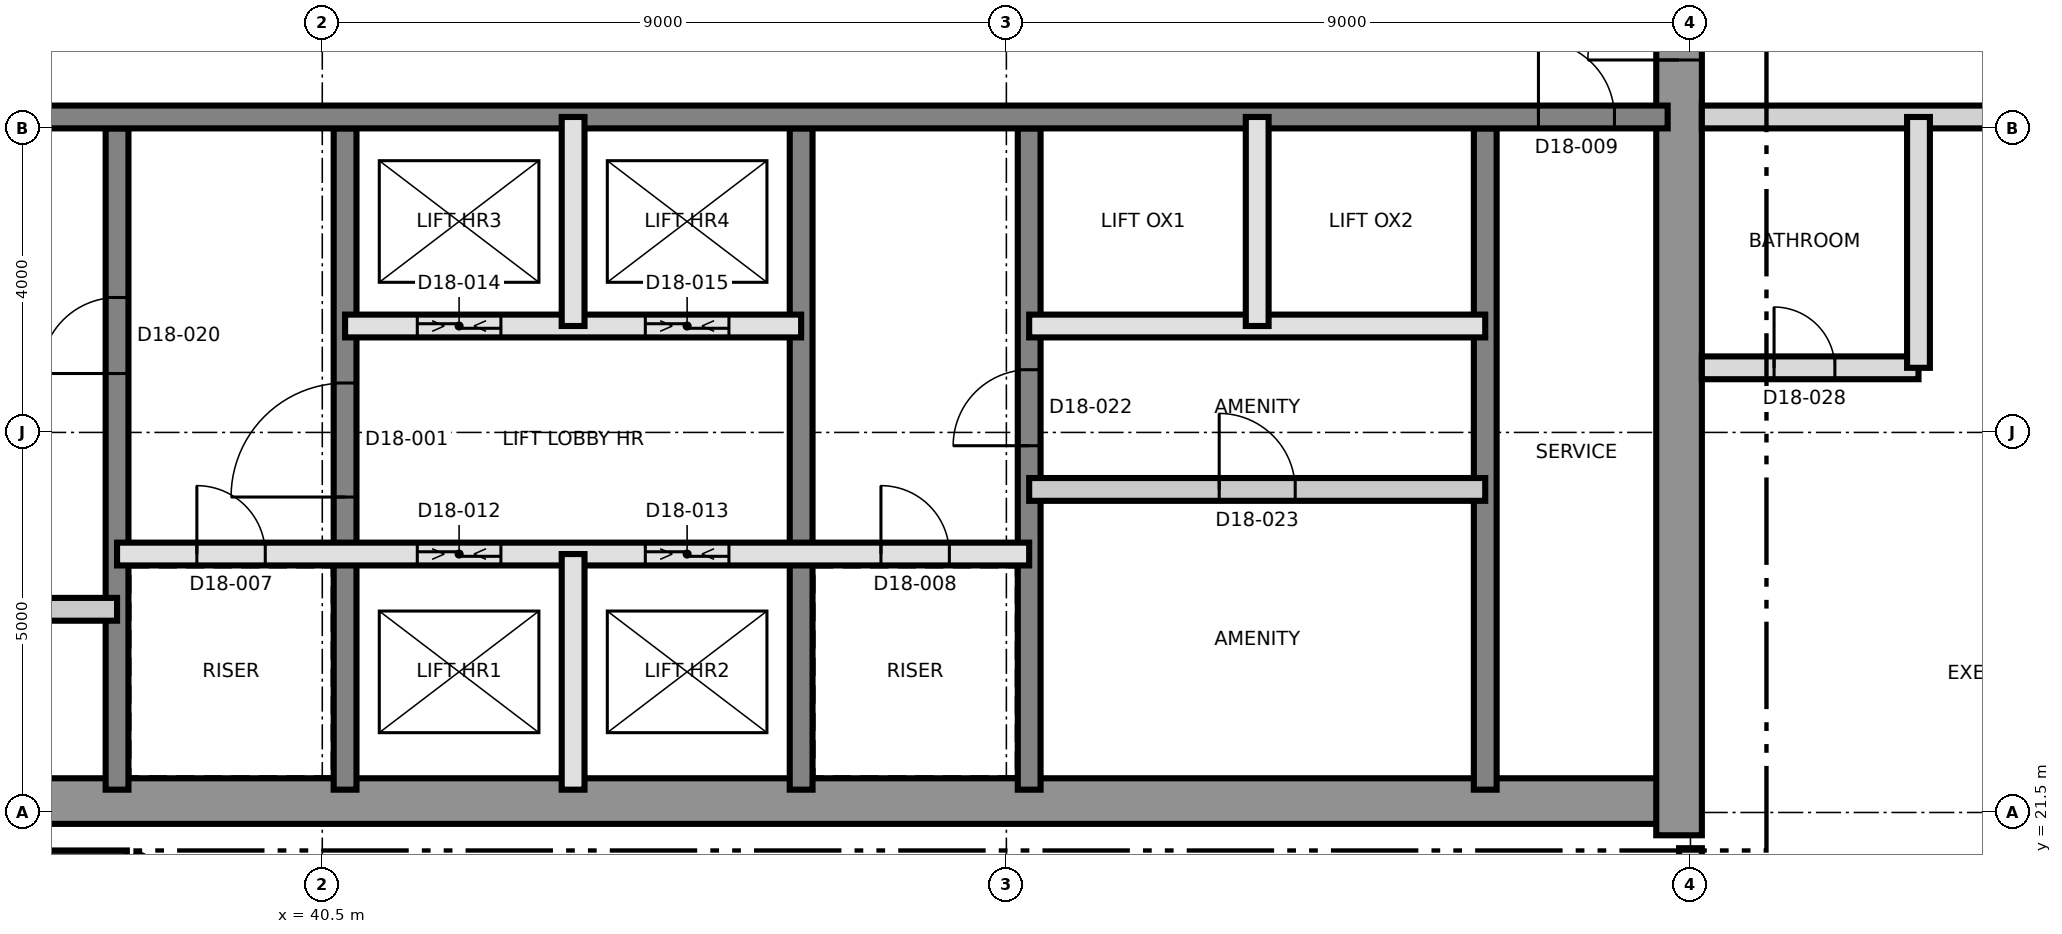
"""IFC4 building model, lengths in metres.
Left out: names, types, materials, properties, quantities, classifications, styles, units other than length and angle.
Written with IfcOpenShell. Run it as: python <this file> out.ifc"""

import sys

from ifc_helpers import new_model, si_unit, direction, frame, frame_2d, origin, place, context, subcontext, project, spatial, rectangle, extrude, element, fill, save


model = new_model("IFC4")
c1 = context("Model", 3, precision=1e-05, world=origin(), true_north=direction((0.0, 1.0)))
c2 = subcontext(c1, "Body", "Model", "MODEL_VIEW")
j1 = project(units=[si_unit("LENGTHUNIT", "METRE"), si_unit("PLANEANGLEUNIT", "RADIAN")], contexts=[c1])
p1 = place(None, origin())
s1 = spatial("IfcSite", under=j1, at=p1, CompositionType="ELEMENT")
p2 = place(p1, origin())
s2 = spatial("IfcBuilding", under=s1, at=p2, CompositionType="ELEMENT")
p3 = place(p2, frame((0.0, 0.0, 175.5)))
s3 = spatial("IfcBuildingStorey", under=s2, at=p3, CompositionType="ELEMENT", Elevation=175.5)
p4 = place(p3, frame((31.2, 21.65, 0.0), z_axis=(0.0, 0.0, 1.0), x_axis=(1.0, 0.0, 0.0)))
e1 = element("IfcWall", 1, at=p4, inside=s3, PredefinedType="SHEAR", context=c2, shape_type="SweptSolid", body=[
    extrude(rectangle(XDim=27.0, YDim=0.6, at=frame_2d((13.5, 0.0))), origin(), (0.0, 0.0, 1.0), 3.7),
])
p5 = place(p3, frame((58.35, 21.2, 0.0), z_axis=(0.0, 0.0, 1.0), x_axis=(0.0, 1.0, 0.0)))
e2 = element("IfcWall", 2, at=p5, inside=s3, PredefinedType="SHEAR", context=c2, shape_type="SweptSolid", body=[
    extrude(rectangle(XDim=18.6, YDim=0.6, at=frame_2d((9.3, 0.0))), origin(), (0.0, 0.0, 1.0), 3.7),
])
p6 = place(p5, frame((10.2, 0.0, 0.0)))
e3 = element("IfcOpeningElement", 3, at=p6, cuts=e2, PredefinedType="OPENING", context=c2, shape_type="SweptSolid", body=[
    extrude(rectangle(XDim=1.2, YDim=2.1, at=frame_2d((0.6, 1.05))), frame((0.0, 0.31, 0.0), z_axis=(0.0, -1.0, 0.0), x_axis=(1.0, 0.0, 0.0)), (0.0, 0.0, 1.0), 0.62),
])
p7 = place(p3, frame((37.8, 21.8, 0.0), z_axis=(0.0, 0.0, 1.0), x_axis=(0.0, 1.0, 0.0)))
e4 = element("IfcWall", 4, at=p7, inside=s3, PredefinedType="SHEAR", context=c2, shape_type="SweptSolid", body=[
    extrude(rectangle(XDim=8.7, YDim=0.3, at=frame_2d((4.35, 0.0))), origin(), (0.0, 0.0, 1.0), 3.7),
])
p8 = place(p7, frame((5.475, 0.0, 0.0)))
e5 = element("IfcOpeningElement", 5, at=p8, cuts=e4, PredefinedType="OPENING", context=c2, shape_type="SweptSolid", body=[
    extrude(rectangle(XDim=1.0, YDim=2.1, at=frame_2d((0.5, 1.05))), frame((0.0, 0.16, 0.0), z_axis=(0.0, -1.0, 0.0), x_axis=(1.0, 0.0, 0.0)), (0.0, 0.0, 1.0), 0.32),
])
p9 = place(p3, frame((40.8, 21.8, 0.0), z_axis=(0.0, 0.0, 1.0), x_axis=(0.0, 1.0, 0.0)))
e6 = element("IfcWall", 6, at=p9, inside=s3, PredefinedType="SHEAR", context=c2, shape_type="SweptSolid", body=[
    extrude(rectangle(XDim=8.7, YDim=0.3, at=frame_2d((4.35, 0.0))), origin(), (0.0, 0.0, 1.0), 3.7),
])
p10 = place(p9, frame((3.85, 0.0, 0.0)))
e7 = element("IfcOpeningElement", 7, at=p10, cuts=e6, PredefinedType="OPENING", context=c2, shape_type="SweptSolid", body=[
    extrude(rectangle(XDim=1.5, YDim=2.1, at=frame_2d((0.75, 1.05))), frame((0.0, 0.16, 0.0), z_axis=(0.0, -1.0, 0.0), x_axis=(1.0, 0.0, 0.0)), (0.0, 0.0, 1.0), 0.32),
])
p11 = place(p3, frame((46.8, 21.8, 0.0), z_axis=(0.0, 0.0, 1.0), x_axis=(0.0, 1.0, 0.0)))
e8 = element("IfcWall", 8, at=p11, inside=s3, PredefinedType="SHEAR", context=c2, shape_type="SweptSolid", body=[
    extrude(rectangle(XDim=8.7, YDim=0.3, at=frame_2d((4.35, 0.0))), origin(), (0.0, 0.0, 1.0), 3.7),
])
p12 = place(p3, frame((49.8, 21.8, 0.0), z_axis=(0.0, 0.0, 1.0), x_axis=(0.0, 1.0, 0.0)))
e9 = element("IfcWall", 9, at=p12, inside=s3, PredefinedType="SHEAR", context=c2, shape_type="SweptSolid", body=[
    extrude(rectangle(XDim=8.7, YDim=0.3, at=frame_2d((4.35, 0.0))), origin(), (0.0, 0.0, 1.0), 3.7),
])
p13 = place(p12, frame((4.525, 0.0, 0.0)))
e10 = element("IfcOpeningElement", 10, at=p13, cuts=e9, PredefinedType="OPENING", context=c2, shape_type="SweptSolid", body=[
    extrude(rectangle(XDim=1.0, YDim=2.1, at=frame_2d((0.5, 1.05))), frame((0.0, 0.16, 0.0), z_axis=(0.0, -1.0, 0.0), x_axis=(1.0, 0.0, 0.0)), (0.0, 0.0, 1.0), 0.32),
])
p14 = place(p3, frame((55.8, 21.8, 0.0), z_axis=(0.0, 0.0, 1.0), x_axis=(0.0, 1.0, 0.0)))
e11 = element("IfcWall", 11, at=p14, inside=s3, PredefinedType="SHEAR", context=c2, shape_type="SweptSolid", body=[
    extrude(rectangle(XDim=8.7, YDim=0.3, at=frame_2d((4.35, 0.0))), origin(), (0.0, 0.0, 1.0), 3.7),
])
p15 = place(p3, frame((31.8, 30.65, 0.0), z_axis=(0.0, 0.0, 1.0), x_axis=(1.0, 0.0, 0.0)))
e12 = element("IfcWall", 12, at=p15, inside=s3, PredefinedType="SHEAR", context=c2, shape_type="SweptSolid", body=[
    extrude(rectangle(XDim=26.4, YDim=0.3, at=frame_2d((13.2, 0.0))), origin(), (0.0, 0.0, 1.0), 3.7),
])
p16 = place(p15, frame((24.7, 0.0, 0.0)))
e13 = element("IfcOpeningElement", 13, at=p16, cuts=e12, PredefinedType="OPENING", context=c2, shape_type="SweptSolid", body=[
    extrude(rectangle(XDim=1.0, YDim=2.1, at=frame_2d((0.5, 1.05))), frame((0.0, 0.16, 0.0), z_axis=(0.0, -1.0, 0.0), x_axis=(1.0, 0.0, 0.0)), (0.0, 0.0, 1.0), 0.32),
])
p17 = place(p3, frame((31.36, 20.85, 0.0), z_axis=(0.0, 0.0, 1.0), x_axis=(1.0, 0.0, 0.0)))
e14 = element("IfcWall", 14, at=p17, inside=s3, PredefinedType="SOLIDWALL", context=c2, shape_type="SweptSolid", body=[
    extrude(rectangle(XDim=6.569, YDim=0.3, at=frame_2d((3.285, 0.0))), origin(), (0.0, 0.0, 1.0), 3.4),
])
p18 = place(p3, frame((37.995, 20.834, 0.0), z_axis=(0.0, 0.0, 1.0), x_axis=(0.896947675211, -0.442136707291, 0.0)))
e15 = element("IfcWall", 15, at=p18, inside=s3, PredefinedType="SOLIDWALL", context=c2, shape_type="SweptSolid", body=[
    extrude(rectangle(XDim=0.501, YDim=0.3, at=frame_2d((0.25, 0.0))), origin(), (0.0, 0.0, 1.0), 3.4),
])
p19 = place(p3, frame((31.8, 24.173, 0.0), z_axis=(0.0, 0.0, 1.0), x_axis=(1.0, 0.0, 0.0)))
e16 = element("IfcWall", 16, at=p19, inside=s3, PredefinedType="PARTITIONING", context=c2, shape_type="SweptSolid", body=[
    extrude(rectangle(XDim=6.0, YDim=0.3, at=frame_2d((3.0, 0.0))), origin(), (0.0, 0.0, 1.0), 3.4),
])
p20 = place(p19, frame((2.5, 0.0, 0.0)))
e17 = element("IfcOpeningElement", 17, at=p20, cuts=e16, PredefinedType="OPENING", context=c2, shape_type="SweptSolid", body=[
    extrude(rectangle(XDim=1.0, YDim=2.1, at=frame_2d((0.5, 1.05))), frame((0.0, 0.16, 0.0), z_axis=(0.0, -1.0, 0.0), x_axis=(1.0, 0.0, 0.0)), (0.0, 0.0, 1.0), 0.32),
])
p21 = place(p3, frame((37.8, 24.9, 0.0), z_axis=(0.0, 0.0, 1.0), x_axis=(1.0, 0.0, 0.0)))
e18 = element("IfcWall", 18, at=p21, inside=s3, PredefinedType="SOLIDWALL", context=c2, shape_type="SweptSolid", body=[
    extrude(rectangle(XDim=12.0, YDim=0.3, at=frame_2d((6.0, 0.0))), origin(), (0.0, 0.0, 1.0), 3.4),
])
p22 = place(p21, frame((1.05, 0.0, 0.0)))
e19 = element("IfcOpeningElement", 19, at=p22, cuts=e18, PredefinedType="OPENING", context=c2, shape_type="SweptSolid", body=[
    extrude(rectangle(XDim=0.9, YDim=2.1, at=frame_2d((0.45, 1.05))), frame((0.0, 0.16, 0.0), z_axis=(0.0, -1.0, 0.0), x_axis=(1.0, 0.0, 0.0)), (0.0, 0.0, 1.0), 0.32),
])
p23 = place(p21, frame((10.05, 0.0, 0.0)))
e20 = element("IfcOpeningElement", 20, at=p23, cuts=e18, PredefinedType="OPENING", context=c2, shape_type="SweptSolid", body=[
    extrude(rectangle(XDim=0.9, YDim=2.1, at=frame_2d((0.45, 1.05))), frame((0.0, 0.16, 0.0), z_axis=(0.0, -1.0, 0.0), x_axis=(1.0, 0.0, 0.0)), (0.0, 0.0, 1.0), 0.32),
])
p24 = place(p21, frame((3.95, 0.0, 0.0)))
e21 = element("IfcOpeningElement", 21, at=p24, cuts=e18, PredefinedType="OPENING", context=c2, shape_type="SweptSolid", body=[
    extrude(rectangle(XDim=1.1, YDim=2.4, at=frame_2d((0.55, 1.2))), frame((0.0, 0.16, 0.0), z_axis=(0.0, -1.0, 0.0), x_axis=(1.0, 0.0, 0.0)), (0.0, 0.0, 1.0), 0.32),
])
p25 = place(p21, frame((6.95, 0.0, 0.0)))
e22 = element("IfcOpeningElement", 22, at=p25, cuts=e18, PredefinedType="OPENING", context=c2, shape_type="SweptSolid", body=[
    extrude(rectangle(XDim=1.1, YDim=2.4, at=frame_2d((0.55, 1.2))), frame((0.0, 0.16, 0.0), z_axis=(0.0, -1.0, 0.0), x_axis=(1.0, 0.0, 0.0)), (0.0, 0.0, 1.0), 0.32),
])
p26 = place(p3, frame((49.8, 25.75, 0.0), z_axis=(0.0, 0.0, 1.0), x_axis=(1.0, 0.0, 0.0)))
e23 = element("IfcWall", 23, at=p26, inside=s3, PredefinedType="PARTITIONING", context=c2, shape_type="SweptSolid", body=[
    extrude(rectangle(XDim=6.0, YDim=0.3, at=frame_2d((3.0, 0.0))), origin(), (0.0, 0.0, 1.0), 3.4),
])
p27 = place(p26, frame((2.5, 0.0, 0.0)))
e24 = element("IfcOpeningElement", 24, at=p27, cuts=e23, PredefinedType="OPENING", context=c2, shape_type="SweptSolid", body=[
    extrude(rectangle(XDim=1.0, YDim=2.1, at=frame_2d((0.5, 1.05))), frame((0.0, 0.16, 0.0), z_axis=(0.0, -1.0, 0.0), x_axis=(1.0, 0.0, 0.0)), (0.0, 0.0, 1.0), 0.32),
])
p28 = place(p3, frame((40.8, 27.9, 0.0), z_axis=(0.0, 0.0, 1.0), x_axis=(1.0, 0.0, 0.0)))
e25 = element("IfcWall", 25, at=p28, inside=s3, PredefinedType="SOLIDWALL", context=c2, shape_type="SweptSolid", body=[
    extrude(rectangle(XDim=6.0, YDim=0.3, at=frame_2d((3.0, 0.0))), origin(), (0.0, 0.0, 1.0), 3.4),
])
p29 = place(p28, frame((0.95, 0.0, 0.0)))
e26 = element("IfcOpeningElement", 26, at=p29, cuts=e25, PredefinedType="OPENING", context=c2, shape_type="SweptSolid", body=[
    extrude(rectangle(XDim=1.1, YDim=2.4, at=frame_2d((0.55, 1.2))), frame((0.0, 0.16, 0.0), z_axis=(0.0, -1.0, 0.0), x_axis=(1.0, 0.0, 0.0)), (0.0, 0.0, 1.0), 0.32),
])
p30 = place(p28, frame((3.95, 0.0, 0.0)))
e27 = element("IfcOpeningElement", 27, at=p30, cuts=e25, PredefinedType="OPENING", context=c2, shape_type="SweptSolid", body=[
    extrude(rectangle(XDim=1.1, YDim=2.4, at=frame_2d((0.55, 1.2))), frame((0.0, 0.16, 0.0), z_axis=(0.0, -1.0, 0.0), x_axis=(1.0, 0.0, 0.0)), (0.0, 0.0, 1.0), 0.32),
])
p31 = place(p3, frame((49.8, 27.9, 0.0), z_axis=(0.0, 0.0, 1.0), x_axis=(1.0, 0.0, 0.0)))
e28 = element("IfcWall", 28, at=p31, inside=s3, PredefinedType="SOLIDWALL", context=c2, shape_type="SweptSolid", body=[
    extrude(rectangle(XDim=6.0, YDim=0.3, at=frame_2d((3.0, 0.0))), origin(), (0.0, 0.0, 1.0), 3.4),
])
p32 = place(p3, frame((43.8, 21.8, 0.0), z_axis=(0.0, 0.0, 1.0), x_axis=(0.0, 1.0, 0.0)))
e29 = element("IfcWall", 29, at=p32, inside=s3, PredefinedType="SOLIDWALL", context=c2, shape_type="SweptSolid", body=[
    extrude(rectangle(XDim=3.1, YDim=0.3, at=frame_2d((1.55, 0.0))), origin(), (0.0, 0.0, 1.0), 3.4),
])
for number, where, z_axis, x_axis in (
    (30, (43.8, 27.9, 0.0), (0.0, 0.0, 1.0), (0.0, 1.0, 0.0)),
    (31, (52.8, 27.9, 0.0), (0.0, 0.0, 1.0), (0.0, 1.0, 0.0)),
):
    element("IfcWall", number, at=place(p3, frame(where, z_axis=z_axis, x_axis=x_axis)), inside=s3, PredefinedType="SOLIDWALL", context=c2, shape_type="SweptSolid", body=[
        extrude(rectangle(XDim=2.75, YDim=0.3, at=frame_2d((1.375, 0.0))), origin(), (0.0, 0.0, 1.0), 3.4),
    ])
p33 = place(p3, frame((58.65, 27.35, 0.0), z_axis=(0.0, 0.0, 1.0), x_axis=(1.0, 0.0, 0.0)))
e32 = element("IfcWall", 32, at=p33, inside=s3, PredefinedType="PARTITIONING", context=c2, shape_type="SweptSolid", body=[
    extrude(rectangle(XDim=2.85, YDim=0.3, at=frame_2d((1.425, 0.0))), origin(), (0.0, 0.0, 1.0), 3.4),
])
p34 = place(p33, frame((0.95, 0.0, 0.0)))
e33 = element("IfcOpeningElement", 33, at=p34, cuts=e32, PredefinedType="OPENING", context=c2, shape_type="SweptSolid", body=[
    extrude(rectangle(XDim=0.8, YDim=2.1, at=frame_2d((0.4, 1.05))), frame((0.0, 0.16, 0.0), z_axis=(0.0, -1.0, 0.0), x_axis=(1.0, 0.0, 0.0)), (0.0, 0.0, 1.0), 0.32),
])
p35 = place(p3, frame((58.65, 30.65, 0.0), z_axis=(0.0, 0.0, 1.0), x_axis=(1.0, 0.0, 0.0)))
e34 = element("IfcWall", 34, at=p35, inside=s3, PredefinedType="PARTITIONING", context=c2, shape_type="SweptSolid", body=[
    extrude(rectangle(XDim=10.28, YDim=0.3, at=frame_2d((5.14, 0.0))), origin(), (0.0, 0.0, 1.0), 2.8),
])
p36 = place(p35, frame((3.85, 0.0, 0.0)))
e35 = element("IfcOpeningElement", 35, at=p36, cuts=e34, PredefinedType="OPENING", context=c2, shape_type="SweptSolid", body=[
    extrude(rectangle(XDim=1.0, YDim=2.4, at=frame_2d((0.5, 1.2))), frame((0.0, 0.16, 0.0), z_axis=(0.0, -1.0, 0.0), x_axis=(1.0, 0.0, 0.0)), (0.0, 0.0, 1.0), 0.32),
])
p37 = place(p3, frame((58.5, 19.705, 0.0), z_axis=(0.0, 0.0, 1.0), x_axis=(0.0, 1.0, 0.0)))
e36 = element("IfcWall", 36, at=p37, inside=s3, PredefinedType="PARTITIONING", context=c2, shape_type="SweptSolid", body=[
    extrude(rectangle(XDim=1.325, YDim=0.3, at=frame_2d((0.663, 0.0))), origin(), (0.0, 0.0, 1.0), 3.4),
])
p38 = place(p3, frame((61.5, 27.35, 0.0), z_axis=(0.0, 0.0, 1.0), x_axis=(0.0, 1.0, 0.0)))
e37 = element("IfcWall", 37, at=p38, inside=s3, PredefinedType="PARTITIONING", context=c2, shape_type="SweptSolid", body=[
    extrude(rectangle(XDim=3.3, YDim=0.3, at=frame_2d((1.65, 0.0))), origin(), (0.0, 0.0, 1.0), 3.4),
])
p39 = place(p10, origin())
e38 = element("IfcDoor", 38, at=p39, inside=s3, OperationType="SINGLE_SWING_RIGHT", PredefinedType="DOOR", context=c2, shape_type="SweptSolid", body=[
    extrude(rectangle(XDim=1.5, YDim=2.1, at=frame_2d((0.75, 1.05))), frame((0.0, 0.025, 0.0), z_axis=(0.0, -1.0, 0.0), x_axis=(1.0, 0.0, 0.0)), (0.0, 0.0, 1.0), 0.05),
])
fill(e7, e38)
p40 = place(p22, origin())
e39 = element("IfcDoor", 39, at=p40, inside=s3, OperationType="SINGLE_SWING_LEFT", PredefinedType="DOOR", context=c2, shape_type="SweptSolid", body=[
    extrude(rectangle(XDim=0.9, YDim=2.1, at=frame_2d((0.45, 1.05))), frame((0.0, 0.025, 0.0), z_axis=(0.0, -1.0, 0.0), x_axis=(1.0, 0.0, 0.0)), (0.0, 0.0, 1.0), 0.05),
])
fill(e19, e39)
p41 = place(p23, origin())
e40 = element("IfcDoor", 40, at=p41, inside=s3, OperationType="SINGLE_SWING_RIGHT", PredefinedType="DOOR", context=c2, shape_type="SweptSolid", body=[
    extrude(rectangle(XDim=0.9, YDim=2.1, at=frame_2d((0.45, 1.05))), frame((0.0, 0.025, 0.0), z_axis=(0.0, -1.0, 0.0), x_axis=(1.0, 0.0, 0.0)), (0.0, 0.0, 1.0), 0.05),
])
fill(e20, e40)
p42 = place(p16, origin())
e41 = element("IfcDoor", 41, at=p42, inside=s3, OperationType="SINGLE_SWING_LEFT", PredefinedType="DOOR", context=c2, shape_type="SweptSolid", body=[
    extrude(rectangle(XDim=1.0, YDim=2.1, at=frame_2d((0.5, 1.05))), frame((0.0, 0.025, 0.0), z_axis=(0.0, -1.0, 0.0), x_axis=(1.0, 0.0, 0.0)), (0.0, 0.0, 1.0), 0.05),
])
fill(e13, e41)
p43 = place(p6, origin())
e42 = element("IfcDoor", 42, at=p43, inside=s3, OperationType="SINGLE_SWING_LEFT", PredefinedType="DOOR", context=c2, shape_type="SweptSolid", body=[
    extrude(rectangle(XDim=1.2, YDim=2.1, at=frame_2d((0.6, 1.05))), frame((0.0, 0.025, 0.0), z_axis=(0.0, -1.0, 0.0), x_axis=(1.0, 0.0, 0.0)), (0.0, 0.0, 1.0), 0.05),
])
fill(e3, e42)
p44 = place(p24, origin())
e43 = element("IfcDoor", 43, at=p44, inside=s3, OperationType="SLIDING_TO_LEFT", PredefinedType="DOOR", context=c2, shape_type="SweptSolid", body=[
    extrude(rectangle(XDim=1.1, YDim=2.4, at=frame_2d((0.55, 1.2))), frame((0.0, 0.025, 0.0), z_axis=(0.0, -1.0, 0.0), x_axis=(1.0, 0.0, 0.0)), (0.0, 0.0, 1.0), 0.05),
])
fill(e21, e43)
p45 = place(p25, origin())
e44 = element("IfcDoor", 44, at=p45, inside=s3, OperationType="SLIDING_TO_LEFT", PredefinedType="DOOR", context=c2, shape_type="SweptSolid", body=[
    extrude(rectangle(XDim=1.1, YDim=2.4, at=frame_2d((0.55, 1.2))), frame((0.0, 0.025, 0.0), z_axis=(0.0, -1.0, 0.0), x_axis=(1.0, 0.0, 0.0)), (0.0, 0.0, 1.0), 0.05),
])
fill(e22, e44)
p46 = place(p29, origin())
e45 = element("IfcDoor", 45, at=p46, inside=s3, OperationType="SLIDING_TO_LEFT", PredefinedType="DOOR", context=c2, shape_type="SweptSolid", body=[
    extrude(rectangle(XDim=1.1, YDim=2.4, at=frame_2d((0.55, 1.2))), frame((0.0, 0.025, 0.0), z_axis=(0.0, -1.0, 0.0), x_axis=(1.0, 0.0, 0.0)), (0.0, 0.0, 1.0), 0.05),
])
fill(e26, e45)
p47 = place(p30, origin())
e46 = element("IfcDoor", 46, at=p47, inside=s3, OperationType="SLIDING_TO_LEFT", PredefinedType="DOOR", context=c2, shape_type="SweptSolid", body=[
    extrude(rectangle(XDim=1.1, YDim=2.4, at=frame_2d((0.55, 1.2))), frame((0.0, 0.025, 0.0), z_axis=(0.0, -1.0, 0.0), x_axis=(1.0, 0.0, 0.0)), (0.0, 0.0, 1.0), 0.05),
])
fill(e27, e46)
p48 = place(p8, origin())
e47 = element("IfcDoor", 47, at=p48, inside=s3, OperationType="SINGLE_SWING_LEFT", PredefinedType="DOOR", context=c2, shape_type="SweptSolid", body=[
    extrude(rectangle(XDim=1.0, YDim=2.1, at=frame_2d((0.5, 1.05))), frame((0.0, 0.025, 0.0), z_axis=(0.0, -1.0, 0.0), x_axis=(1.0, 0.0, 0.0)), (0.0, 0.0, 1.0), 0.05),
])
fill(e5, e47)
p49 = place(p13, origin())
e48 = element("IfcDoor", 48, at=p49, inside=s3, OperationType="SINGLE_SWING_LEFT", PredefinedType="DOOR", context=c2, shape_type="SweptSolid", body=[
    extrude(rectangle(XDim=1.0, YDim=2.1, at=frame_2d((0.5, 1.05))), frame((0.0, 0.025, 0.0), z_axis=(0.0, -1.0, 0.0), x_axis=(1.0, 0.0, 0.0)), (0.0, 0.0, 1.0), 0.05),
])
fill(e10, e48)
p50 = place(p27, origin())
e49 = element("IfcDoor", 49, at=p50, inside=s3, OperationType="SINGLE_SWING_RIGHT", PredefinedType="DOOR", context=c2, shape_type="SweptSolid", body=[
    extrude(rectangle(XDim=1.0, YDim=2.1, at=frame_2d((0.5, 1.05))), frame((0.0, 0.025, 0.0), z_axis=(0.0, -1.0, 0.0), x_axis=(1.0, 0.0, 0.0)), (0.0, 0.0, 1.0), 0.05),
])
fill(e24, e49)
p51 = place(p34, origin())
e50 = element("IfcDoor", 50, at=p51, inside=s3, OperationType="SINGLE_SWING_LEFT", PredefinedType="DOOR", context=c2, shape_type="SweptSolid", body=[
    extrude(rectangle(XDim=0.8, YDim=2.1, at=frame_2d((0.4, 1.05))), frame((0.0, 0.025, 0.0), z_axis=(0.0, -1.0, 0.0), x_axis=(1.0, 0.0, 0.0)), (0.0, 0.0, 1.0), 0.05),
])
fill(e33, e50)
save(model, sys.argv[1])
